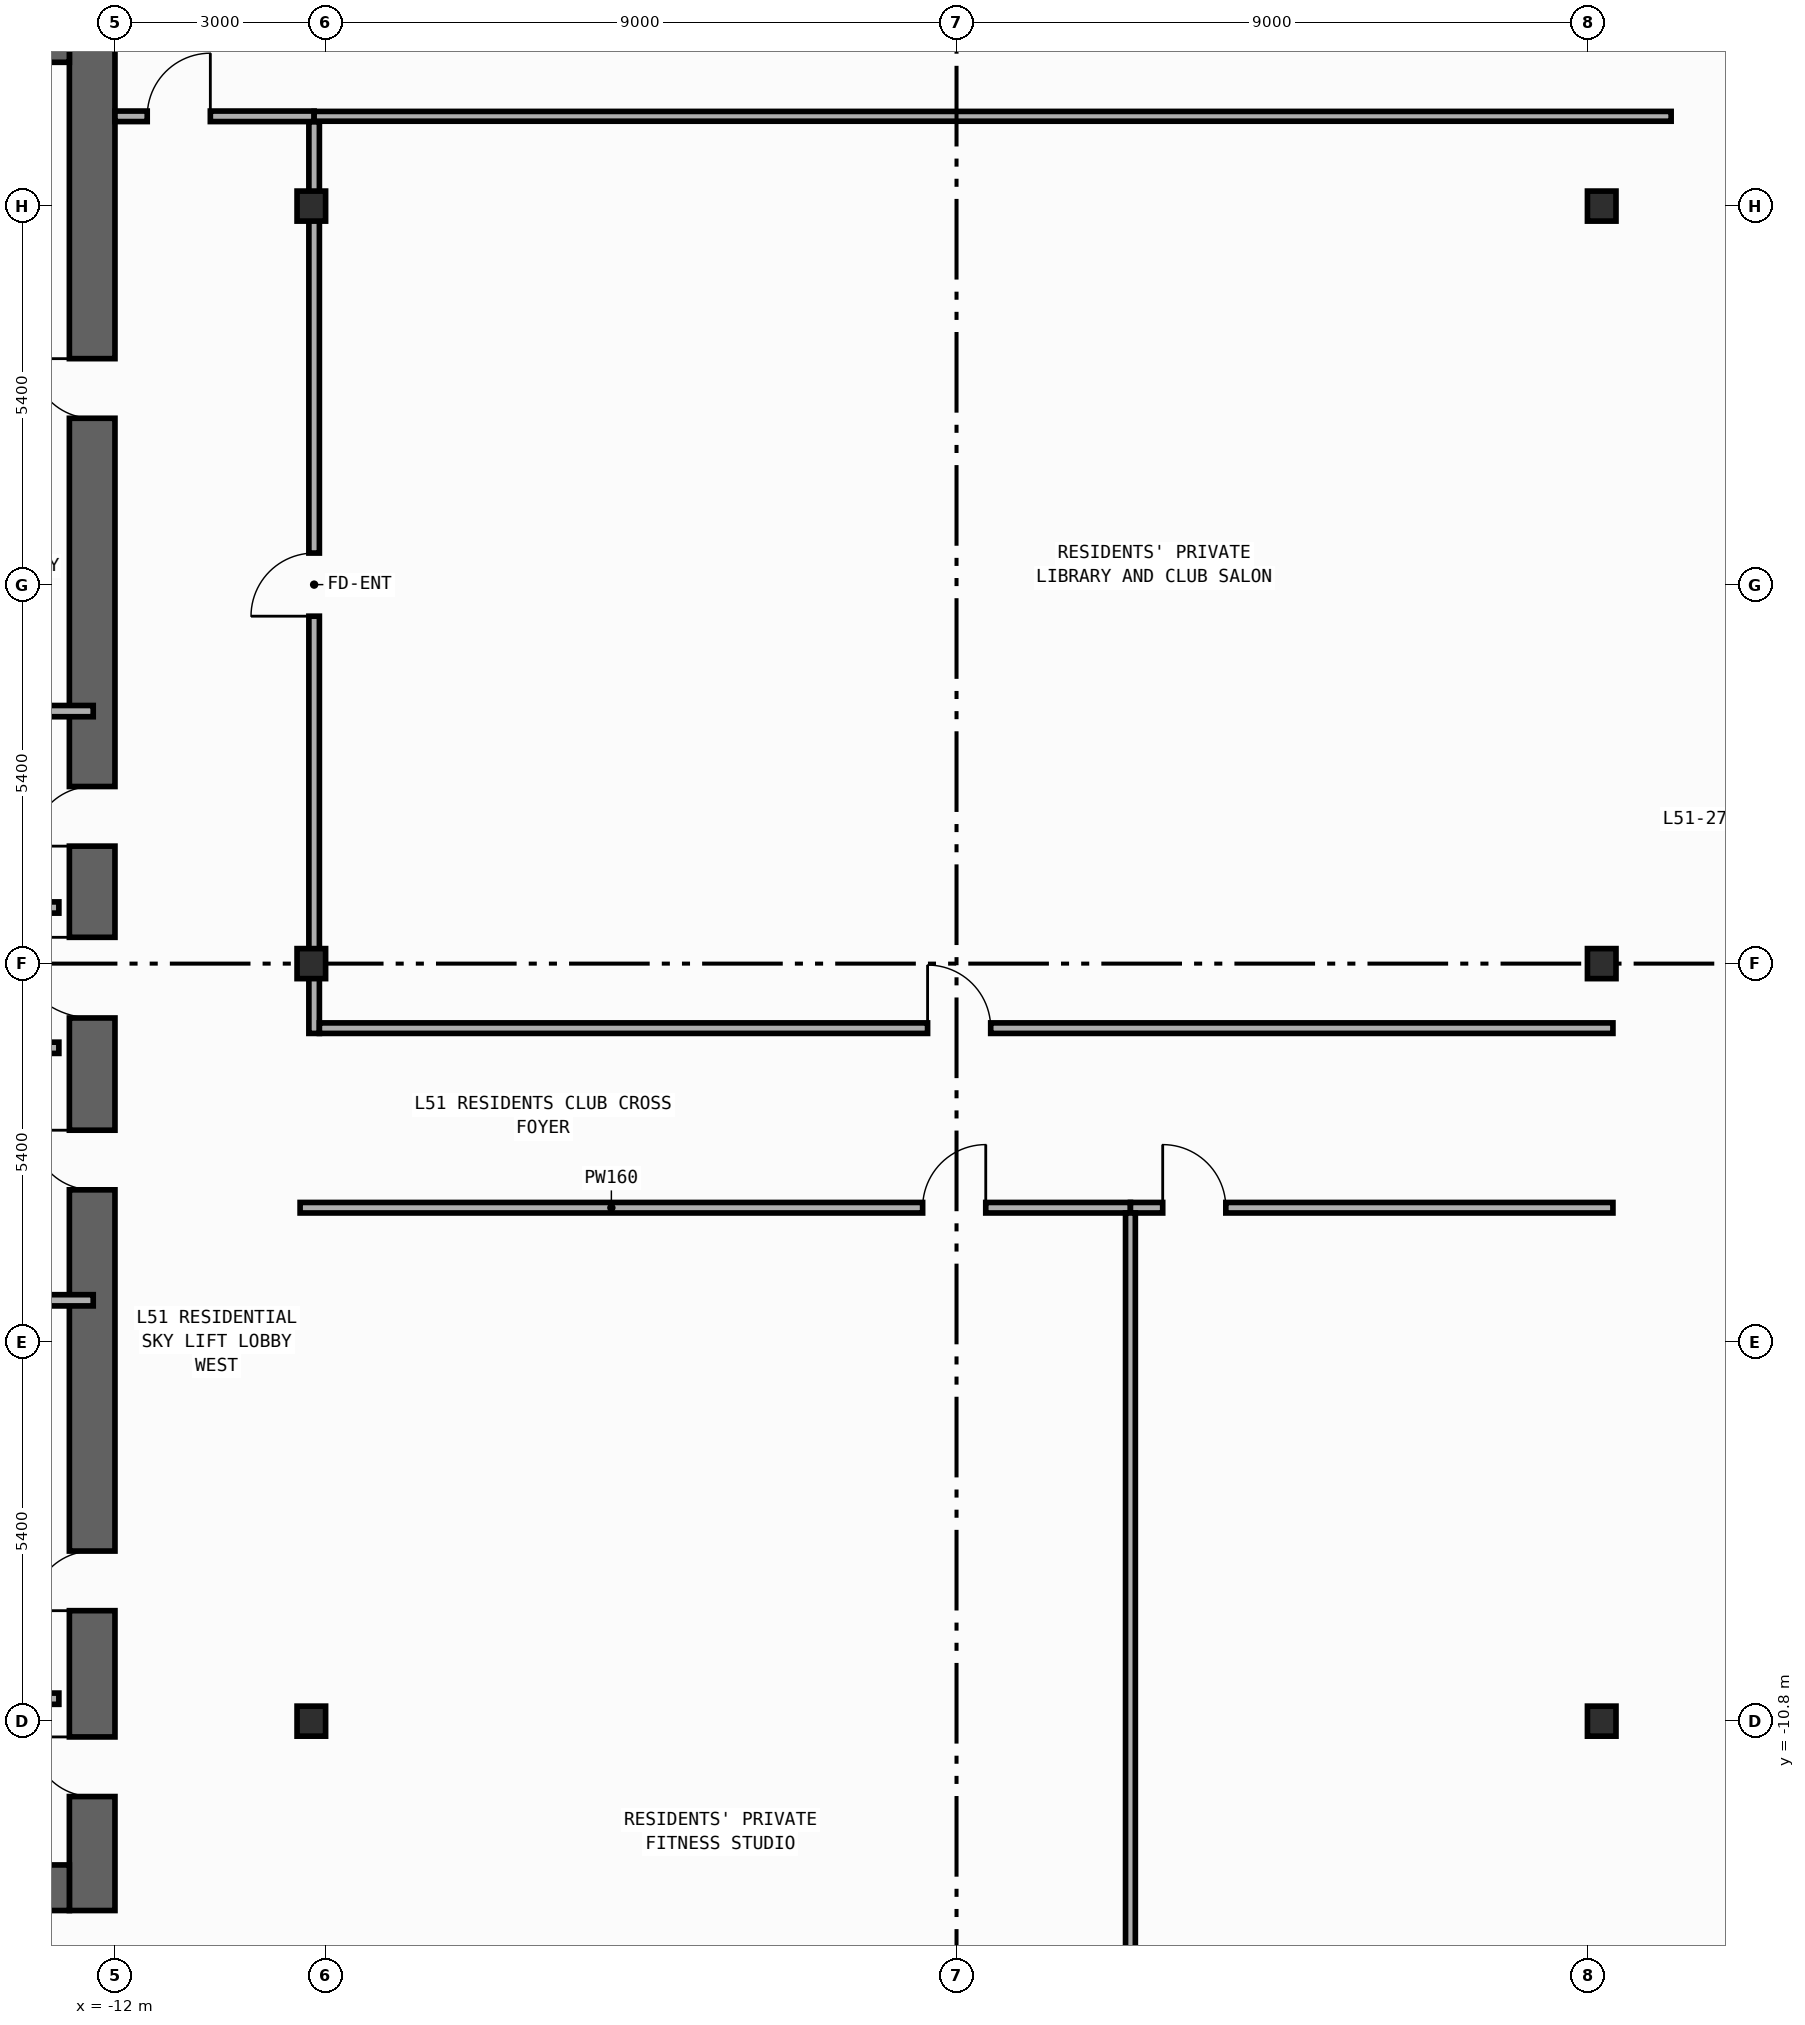
"""IFC4 building model, lengths in metres.
Left out: names, types, materials, properties, quantities, classifications, styles, units other than length and angle.
Written with IfcOpenShell. Run it as: python <this file> out.ifc"""

import sys

from ifc_helpers import new_model, si_unit, direction, frame, frame_2d, origin, origin_2d, place, context, subcontext, project, spatial, rectangle, i_section, extrude, element, fill, save


model = new_model("IFC4")
c1 = context("Model", 3, precision=1e-05, world=origin(), true_north=direction((0.0, 1.0)))
c2 = subcontext(c1, "Body", "Model", "MODEL_VIEW")
j1 = project(units=[si_unit("LENGTHUNIT", "METRE"), si_unit("PLANEANGLEUNIT", "RADIAN")], contexts=[c1])
p1 = place(None, origin())
s1 = spatial("IfcSite", under=j1, at=p1, CompositionType="ELEMENT")
p2 = place(p1, origin())
s2 = spatial("IfcBuilding", under=s1, at=p2, CompositionType="ELEMENT")
p3 = place(p2, frame((0.0, 0.0, 222.4)))
s3 = spatial("IfcBuildingStorey", under=s2, at=p3, CompositionType="ELEMENT", Elevation=222.4)
p4 = place(p3, frame((-12.325, -13.5, 0.0), z_axis=(0.0, 0.0, 1.0), x_axis=(0.0, 1.0, 0.0)))
e1 = element("IfcWall", 1, at=p4, inside=s3, PredefinedType="SHEAR", context=c2, shape_type="SweptSolid", body=[
    extrude(rectangle(XDim=27.0, YDim=0.65, at=frame_2d((13.5, 0.0))), origin(), (0.0, 0.0, 1.0), 3.34),
])
p5 = place(p4, frame((15.175, 0.0, 0.0)))
e2 = element("IfcOpeningElement", 2, at=p5, cuts=e1, PredefinedType="OPENING", context=c2, shape_type="SweptSolid", body=[
    extrude(rectangle(XDim=0.85, YDim=2.1, at=frame_2d((0.425, 1.05))), frame((0.0, 0.335, 0.0), z_axis=(0.0, -1.0, 0.0), x_axis=(1.0, 0.0, 0.0)), (0.0, 0.0, 1.0), 0.67),
])
p6 = place(p4, frame((21.275, 0.0, 0.0)))
e3 = element("IfcOpeningElement", 3, at=p6, cuts=e1, PredefinedType="OPENING", context=c2, shape_type="SweptSolid", body=[
    extrude(rectangle(XDim=0.85, YDim=2.1, at=frame_2d((0.425, 1.05))), frame((0.0, 0.335, 0.0), z_axis=(0.0, -1.0, 0.0), x_axis=(1.0, 0.0, 0.0)), (0.0, 0.0, 1.0), 0.67),
])
p7 = place(p4, frame((4.275, 0.0, 0.0)))
e4 = element("IfcOpeningElement", 4, at=p7, cuts=e1, PredefinedType="OPENING", context=c2, shape_type="SweptSolid", body=[
    extrude(rectangle(XDim=0.85, YDim=2.1, at=frame_2d((0.425, 1.05))), frame((0.0, 0.335, 0.0), z_axis=(0.0, -1.0, 0.0), x_axis=(1.0, 0.0, 0.0)), (0.0, 0.0, 1.0), 0.67),
])
p8 = place(p4, frame((10.275, 0.0, 0.0)))
e5 = element("IfcOpeningElement", 5, at=p8, cuts=e1, PredefinedType="OPENING", context=c2, shape_type="SweptSolid", body=[
    extrude(rectangle(XDim=0.85, YDim=2.1, at=frame_2d((0.425, 1.05))), frame((0.0, 0.335, 0.0), z_axis=(0.0, -1.0, 0.0), x_axis=(1.0, 0.0, 0.0)), (0.0, 0.0, 1.0), 0.67),
])
p9 = place(p4, frame((12.725, 0.0, 0.0)))
e6 = element("IfcOpeningElement", 6, at=p9, cuts=e1, PredefinedType="OPENING", context=c2, shape_type="SweptSolid", body=[
    extrude(rectangle(XDim=1.15, YDim=2.2, at=frame_2d((0.575, 1.1))), frame((0.0, 0.335, 0.0), z_axis=(0.0, -1.0, 0.0), x_axis=(1.0, 0.0, 0.0)), (0.0, 0.0, 1.0), 0.67),
])
p10 = place(p4, frame((1.625, 0.0, 0.0)))
e7 = element("IfcOpeningElement", 7, at=p10, cuts=e1, PredefinedType="OPENING", context=c2, shape_type="SweptSolid", body=[
    extrude(rectangle(XDim=0.85, YDim=2.1, at=frame_2d((0.425, 1.05))), frame((0.0, 0.335, 0.0), z_axis=(0.0, -1.0, 0.0), x_axis=(1.0, 0.0, 0.0)), (0.0, 0.0, 1.0), 0.67),
])
for number, where, z_axis, x_axis in (
    (8, (-19.75, -13.175, 0.0), (0.0, 0.0, 1.0), (1.0, 0.0, 0.0)),
    (9, (-19.75, 13.175, 0.0), (0.0, 0.0, 1.0), (1.0, 0.0, 0.0)),
):
    element("IfcWall", number, at=place(p3, frame(where, z_axis=z_axis, x_axis=x_axis)), inside=s3, PredefinedType="SHEAR", context=c2, shape_type="SweptSolid", body=[
        extrude(rectangle(XDim=7.1, YDim=0.65, at=frame_2d((3.55, 0.0))), origin(), (0.0, 0.0, 1.0), 3.34),
    ])
for number, where, z_axis, x_axis in (
    (10, (-9.2, -10.8, 0.0), (0.0, 0.0, 1.0), (1.0, 0.0, 0.0)),
    (11, (-9.2, 0.0, 0.0), (0.0, 0.0, 1.0), (1.0, 0.0, 0.0)),
    (12, (-9.2, 10.8, 0.0), (0.0, 0.0, 1.0), (1.0, 0.0, 0.0)),
    (13, (9.2, -10.8, 0.0), (0.0, 0.0, 1.0), (1.0, 0.0, 0.0)),
    (14, (9.2, 0.0, 0.0), (0.0, 0.0, 1.0), (1.0, 0.0, 0.0)),
    (15, (9.2, 10.8, 0.0), (0.0, 0.0, 1.0), (1.0, 0.0, 0.0)),
):
    element("IfcColumn", number, at=place(p3, frame(where, z_axis=z_axis, x_axis=x_axis)), inside=s3, PredefinedType="COLUMN", context=c2, shape_type="SweptSolid", body=[
        extrude(i_section(OverallWidth=0.407, OverallDepth=0.428, WebThickness=0.02, FlangeThickness=0.035, FilletRadius=0.022, at=origin_2d()), origin(), (0.0, 0.0, 1.0), 3.6),
    ])
for number, where, z_axis, x_axis in (
    (16, (-15.4, 0.8, 0.0), (0.0, 0.0, 1.0), (1.0, 0.0, 0.0)),
    (17, (-15.4, -1.2, 0.0), (0.0, 0.0, 1.0), (1.0, 0.0, 0.0)),
    (18, (-15.4, -10.48, 0.0), (0.0, 0.0, 1.0), (1.0, 0.0, 0.0)),
):
    element("IfcWall", number, at=place(p3, frame(where, z_axis=z_axis, x_axis=x_axis)), inside=s3, PredefinedType="STANDARD", context=c2, shape_type="SweptSolid", body=[
        extrude(rectangle(XDim=2.6, YDim=0.16, at=frame_2d((1.3, 0.0))), origin(), (0.0, 0.0, 1.0), 3.34),
    ])
for number, where, z_axis, x_axis in (
    (19, (-15.375, 3.6, 0.0), (0.0, 0.0, 1.0), (1.0, 0.0, 0.0)),
    (20, (-15.375, -4.8, 0.0), (0.0, 0.0, 1.0), (1.0, 0.0, 0.0)),
):
    element("IfcWall", number, at=place(p3, frame(where, z_axis=z_axis, x_axis=x_axis)), inside=s3, PredefinedType="PARTITIONING", context=c2, shape_type="SweptSolid", body=[
        extrude(rectangle(XDim=3.065, YDim=0.16, at=frame_2d((1.532, 0.0))), origin(), (0.0, 0.0, 1.0), 3.34),
    ])
p11 = place(p3, frame((-9.16, -0.995, 0.0), z_axis=(0.0, 0.0, 1.0), x_axis=(0.0, 1.0, 0.0)))
e21 = element("IfcWall", 21, at=p11, inside=s3, PredefinedType="PARTITIONING", context=c2, shape_type="SweptSolid", body=[
    extrude(rectangle(XDim=13.0, YDim=0.15, at=frame_2d((6.5, 0.0))), origin(), (0.0, 0.0, 1.0), 2.44),
])
p12 = place(p11, frame((5.948, 0.0, 0.0)))
e22 = element("IfcOpeningElement", 22, at=p12, cuts=e21, PredefinedType="OPENING", context=c2, shape_type="SweptSolid", body=[
    extrude(rectangle(XDim=0.9, YDim=2.15, at=frame_2d((0.45, 1.075))), frame((0.0, 0.085, 0.0), z_axis=(0.0, -1.0, 0.0), x_axis=(1.0, 0.0, 0.0)), (0.0, 0.0, 1.0), 0.17),
])
p13 = place(p3, frame((-12.0, 12.08, 0.0), z_axis=(0.0, 0.0, 1.0), x_axis=(1.0, 0.0, 0.0)))
e23 = element("IfcWall", 23, at=p13, inside=s3, PredefinedType="PARTITIONING", context=c2, shape_type="SweptSolid", body=[
    extrude(rectangle(XDim=2.84, YDim=0.15, at=frame_2d((1.42, 0.0))), origin(), (0.0, 0.0, 1.0), 3.34),
])
p14 = place(p13, frame((0.46, 0.0, 0.0)))
e24 = element("IfcOpeningElement", 24, at=p14, cuts=e23, PredefinedType="OPENING", context=c2, shape_type="SweptSolid", body=[
    extrude(rectangle(XDim=0.9, YDim=2.15, at=frame_2d((0.45, 1.075))), frame((0.0, 0.085, 0.0), z_axis=(0.0, -1.0, 0.0), x_axis=(1.0, 0.0, 0.0)), (0.0, 0.0, 1.0), 0.17),
])
p15 = place(p3, frame((-9.085, -0.92, 0.0), z_axis=(0.0, 0.0, 1.0), x_axis=(1.0, 0.0, 0.0)))
e25 = element("IfcWall", 25, at=p15, inside=s3, PredefinedType="PARTITIONING", context=c2, shape_type="SweptSolid", body=[
    extrude(rectangle(XDim=18.445, YDim=0.15, at=frame_2d((9.223, 0.0))), origin(), (0.0, 0.0, 1.0), 3.34),
])
p16 = place(p15, frame((8.672, 0.0, 0.0)))
e26 = element("IfcOpeningElement", 26, at=p16, cuts=e25, PredefinedType="OPENING", context=c2, shape_type="SweptSolid", body=[
    extrude(rectangle(XDim=0.9, YDim=2.15, at=frame_2d((0.45, 1.075))), frame((0.0, 0.085, 0.0), z_axis=(0.0, -1.0, 0.0), x_axis=(1.0, 0.0, 0.0)), (0.0, 0.0, 1.0), 0.17),
])
p17 = place(p3, frame((-9.36, -3.48, 0.0), z_axis=(0.0, 0.0, 1.0), x_axis=(1.0, 0.0, 0.0)))
e27 = element("IfcWall", 27, at=p17, inside=s3, PredefinedType="PARTITIONING", context=c2, shape_type="SweptSolid", body=[
    extrude(rectangle(XDim=11.84, YDim=0.15, at=frame_2d((5.92, 0.0))), origin(), (0.0, 0.0, 1.0), 3.34),
])
p18 = place(p17, frame((8.877, 0.0, 0.0)))
e28 = element("IfcOpeningElement", 28, at=p18, cuts=e27, PredefinedType="OPENING", context=c2, shape_type="SweptSolid", body=[
    extrude(rectangle(XDim=0.9, YDim=2.15, at=frame_2d((0.45, 1.075))), frame((0.0, 0.085, 0.0), z_axis=(0.0, -1.0, 0.0), x_axis=(1.0, 0.0, 0.0)), (0.0, 0.0, 1.0), 0.17),
])
p19 = place(p3, frame((2.48, -3.48, 0.0), z_axis=(0.0, 0.0, 1.0), x_axis=(1.0, 0.0, 0.0)))
e29 = element("IfcWall", 29, at=p19, inside=s3, PredefinedType="PARTITIONING", context=c2, shape_type="SweptSolid", body=[
    extrude(rectangle(XDim=6.88, YDim=0.15, at=frame_2d((3.44, 0.0))), origin(), (0.0, 0.0, 1.0), 3.34),
])
p20 = place(p19, frame((0.46, 0.0, 0.0)))
e30 = element("IfcOpeningElement", 30, at=p20, cuts=e29, PredefinedType="OPENING", context=c2, shape_type="SweptSolid", body=[
    extrude(rectangle(XDim=0.9, YDim=2.15, at=frame_2d((0.45, 1.075))), frame((0.0, 0.085, 0.0), z_axis=(0.0, -1.0, 0.0), x_axis=(1.0, 0.0, 0.0)), (0.0, 0.0, 1.0), 0.17),
])
p21 = place(p3, frame((-9.16, 12.08, 0.0), z_axis=(0.0, 0.0, 1.0), x_axis=(1.0, 0.0, 0.0)))
e31 = element("IfcWall", 31, at=p21, inside=s3, PredefinedType="PARTITIONING", context=c2, shape_type="SweptSolid", body=[
    extrude(rectangle(XDim=19.35, YDim=0.14, at=frame_2d((9.675, 0.0))), origin(), (0.0, 0.0, 1.0), 3.34),
])
p22 = place(p3, frame((2.48, -24.761, 0.0), z_axis=(0.0, 0.0, 1.0), x_axis=(0.0, 1.0, 0.0)))
e32 = element("IfcWall", 32, at=p22, inside=s3, PredefinedType="PARTITIONING", context=c2, shape_type="SweptSolid", body=[
    extrude(rectangle(XDim=21.206, YDim=0.14, at=frame_2d((10.603, 0.0))), origin(), (0.0, 0.0, 1.0), 3.34),
])
p23 = place(p5, origin())
e33 = element("IfcDoor", 33, at=p23, inside=s3, OperationType="SINGLE_SWING_LEFT", PredefinedType="DOOR", context=c2, shape_type="SweptSolid", body=[
    extrude(rectangle(XDim=0.85, YDim=2.1, at=frame_2d((0.425, 1.05))), frame((0.0, 0.025, 0.0), z_axis=(0.0, -1.0, 0.0), x_axis=(1.0, 0.0, 0.0)), (0.0, 0.0, 1.0), 0.05),
])
fill(e2, e33)
p24 = place(p6, origin())
e34 = element("IfcDoor", 34, at=p24, inside=s3, OperationType="SINGLE_SWING_RIGHT", PredefinedType="DOOR", context=c2, shape_type="SweptSolid", body=[
    extrude(rectangle(XDim=0.85, YDim=2.1, at=frame_2d((0.425, 1.05))), frame((0.0, 0.025, 0.0), z_axis=(0.0, -1.0, 0.0), x_axis=(1.0, 0.0, 0.0)), (0.0, 0.0, 1.0), 0.05),
])
fill(e3, e34)
p25 = place(p7, origin())
e35 = element("IfcDoor", 35, at=p25, inside=s3, OperationType="SINGLE_SWING_LEFT", PredefinedType="DOOR", context=c2, shape_type="SweptSolid", body=[
    extrude(rectangle(XDim=0.85, YDim=2.1, at=frame_2d((0.425, 1.05))), frame((0.0, 0.025, 0.0), z_axis=(0.0, -1.0, 0.0), x_axis=(1.0, 0.0, 0.0)), (0.0, 0.0, 1.0), 0.05),
])
fill(e4, e35)
p26 = place(p8, origin())
e36 = element("IfcDoor", 36, at=p26, inside=s3, OperationType="SINGLE_SWING_RIGHT", PredefinedType="DOOR", context=c2, shape_type="SweptSolid", body=[
    extrude(rectangle(XDim=0.85, YDim=2.1, at=frame_2d((0.425, 1.05))), frame((0.0, 0.025, 0.0), z_axis=(0.0, -1.0, 0.0), x_axis=(1.0, 0.0, 0.0)), (0.0, 0.0, 1.0), 0.05),
])
fill(e5, e36)
p27 = place(p9, origin())
e37 = element("IfcDoor", 37, at=p27, inside=s3, OperationType="SINGLE_SWING_RIGHT", PredefinedType="DOOR", context=c2, shape_type="SweptSolid", body=[
    extrude(rectangle(XDim=1.15, YDim=2.2, at=frame_2d((0.575, 1.1))), frame((0.0, 0.025, 0.0), z_axis=(0.0, -1.0, 0.0), x_axis=(1.0, 0.0, 0.0)), (0.0, 0.0, 1.0), 0.05),
])
fill(e6, e37)
p28 = place(p10, origin())
e38 = element("IfcDoor", 38, at=p28, inside=s3, OperationType="SINGLE_SWING_RIGHT", PredefinedType="DOOR", context=c2, shape_type="SweptSolid", body=[
    extrude(rectangle(XDim=0.85, YDim=2.1, at=frame_2d((0.425, 1.05))), frame((0.0, 0.025, 0.0), z_axis=(0.0, -1.0, 0.0), x_axis=(1.0, 0.0, 0.0)), (0.0, 0.0, 1.0), 0.05),
])
fill(e7, e38)
p29 = place(p12, origin())
e39 = element("IfcDoor", 39, at=p29, inside=s3, OperationType="SINGLE_SWING_LEFT", PredefinedType="DOOR", context=c2, shape_type="SweptSolid", body=[
    extrude(rectangle(XDim=0.9, YDim=2.15, at=frame_2d((0.45, 1.075))), frame((0.0, 0.025, 0.0), z_axis=(0.0, -1.0, 0.0), x_axis=(1.0, 0.0, 0.0)), (0.0, 0.0, 1.0), 0.05),
])
fill(e22, e39)
p30 = place(p14, origin())
e40 = element("IfcDoor", 40, at=p30, inside=s3, OperationType="SINGLE_SWING_RIGHT", PredefinedType="DOOR", context=c2, shape_type="SweptSolid", body=[
    extrude(rectangle(XDim=0.9, YDim=2.15, at=frame_2d((0.45, 1.075))), frame((0.0, 0.025, 0.0), z_axis=(0.0, -1.0, 0.0), x_axis=(1.0, 0.0, 0.0)), (0.0, 0.0, 1.0), 0.05),
])
fill(e24, e40)
p31 = place(p16, origin())
e41 = element("IfcDoor", 41, at=p31, inside=s3, OperationType="SINGLE_SWING_LEFT", PredefinedType="DOOR", context=c2, shape_type="SweptSolid", body=[
    extrude(rectangle(XDim=0.9, YDim=2.15, at=frame_2d((0.45, 1.075))), frame((0.0, 0.025, 0.0), z_axis=(0.0, -1.0, 0.0), x_axis=(1.0, 0.0, 0.0)), (0.0, 0.0, 1.0), 0.05),
])
fill(e26, e41)
p32 = place(p18, origin())
e42 = element("IfcDoor", 42, at=p32, inside=s3, OperationType="SINGLE_SWING_RIGHT", PredefinedType="DOOR", context=c2, shape_type="SweptSolid", body=[
    extrude(rectangle(XDim=0.9, YDim=2.15, at=frame_2d((0.45, 1.075))), frame((0.0, 0.025, 0.0), z_axis=(0.0, -1.0, 0.0), x_axis=(1.0, 0.0, 0.0)), (0.0, 0.0, 1.0), 0.05),
])
fill(e28, e42)
p33 = place(p20, origin())
e43 = element("IfcDoor", 43, at=p33, inside=s3, OperationType="SINGLE_SWING_LEFT", PredefinedType="DOOR", context=c2, shape_type="SweptSolid", body=[
    extrude(rectangle(XDim=0.9, YDim=2.15, at=frame_2d((0.45, 1.075))), frame((0.0, 0.025, 0.0), z_axis=(0.0, -1.0, 0.0), x_axis=(1.0, 0.0, 0.0)), (0.0, 0.0, 1.0), 0.05),
])
fill(e30, e43)
save(model, sys.argv[1])
